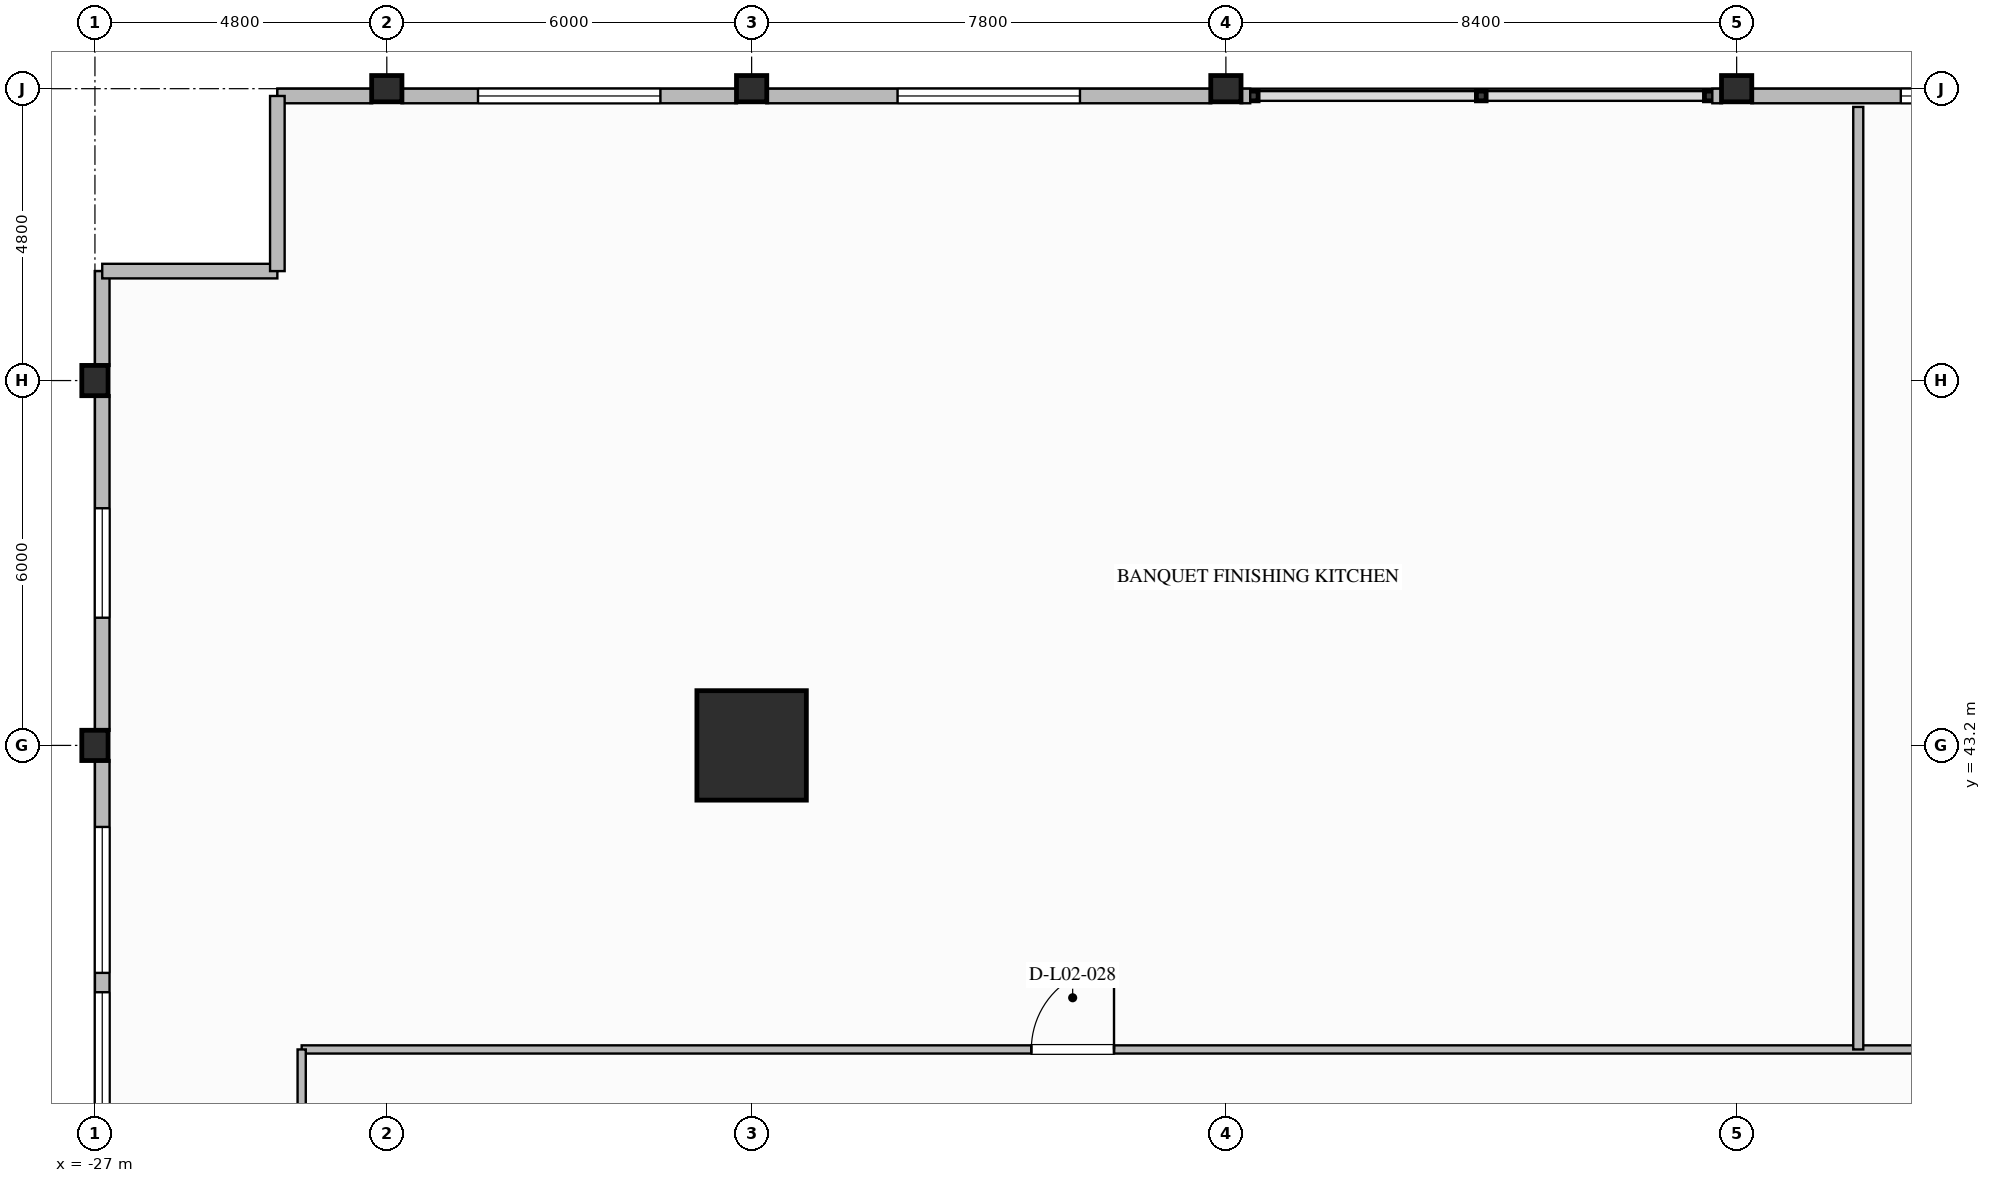
"""IFC4 building model, lengths in metres.
Left out: names, types, materials, properties, quantities, classifications, styles, units other than length and angle.
Written with IfcOpenShell. Run it as: python <this file> out.ifc"""

import sys

from ifc_helpers import new_model, si_unit, direction, frame, frame_2d, origin, origin_2d, place, context, subcontext, project, spatial, rectangle, i_section, extrude, element, fill, save


model = new_model("IFC4")
c1 = context("Model", 3, precision=1e-05, world=origin(), true_north=direction((0.0, 1.0)))
c2 = subcontext(c1, "Body", "Model", "MODEL_VIEW")
j1 = project(units=[si_unit("LENGTHUNIT", "METRE"), si_unit("PLANEANGLEUNIT", "RADIAN")], contexts=[c1])
p1 = place(None, origin())
s1 = spatial("IfcSite", under=j1, at=p1, CompositionType="ELEMENT")
p2 = place(p1, origin())
s2 = spatial("IfcBuilding", under=s1, at=p2, CompositionType="ELEMENT")
p3 = place(p2, frame((0.0, 0.0, 10.8)))
s3 = spatial("IfcBuildingStorey", under=s2, at=p3, CompositionType="ELEMENT", Elevation=10.8)
p4 = place(p3, frame((-16.2, 43.2, 0.0), z_axis=(0.0, 0.0, 1.0), x_axis=(1.0, 0.0, 0.0)))
e1 = element("IfcColumn", 1, at=p4, inside=s3, PredefinedType="COLUMN", context=c2, shape_type="SweptSolid", body=[
    extrude(rectangle(XDim=1.8, YDim=1.8, at=origin_2d()), origin(), (0.0, 0.0, 1.0), 6.4),
])
for number, where, z_axis, x_axis in (
    (2, (-27.0, 43.2, 0.0), (0.0, 0.0, 1.0), (1.0, 0.0, 0.0)),
    (3, (-27.0, 49.2, 0.0), (0.0, 0.0, 1.0), (1.0, 0.0, 0.0)),
    (4, (-22.2, 54.0, 0.0), (0.0, 0.0, 1.0), (0.0, 1.0, 0.0)),
    (5, (-16.2, 54.0, 0.0), (0.0, 0.0, 1.0), (0.0, 1.0, 0.0)),
    (6, (-8.4, 54.0, 0.0), (0.0, 0.0, 1.0), (0.0, 1.0, 0.0)),
    (7, (0.0, 54.0, 0.0), (0.0, 0.0, 1.0), (0.0, 1.0, 0.0)),
):
    element("IfcColumn", number, at=place(p3, frame(where, z_axis=z_axis, x_axis=x_axis)), inside=s3, PredefinedType="COLUMN", context=c2, shape_type="SweptSolid", body=[
        extrude(i_section(OverallWidth=0.432, OverallDepth=0.498, WebThickness=0.056, FlangeThickness=0.089, FilletRadius=0.03, at=origin_2d()), origin(), (0.0, 0.0, 1.0), 6.4),
    ])
p5 = place(p3, frame((-26.88, 35.641, 0.0), z_axis=(0.0, 0.0, 1.0), x_axis=(0.0, 1.0, 0.0)))
e8 = element("IfcWall", 8, at=p5, inside=s3, PredefinedType="STANDARD", context=c2, shape_type="SweptSolid", body=[
    extrude(rectangle(XDim=7.318, YDim=0.24, at=frame_2d((3.659, 0.0))), origin(), (0.0, 0.0, 1.0), 5.404),
])
p6 = place(p5, frame((1.1, 0.0, 0.7)))
e9 = element("IfcOpeningElement", 9, at=p6, cuts=e8, PredefinedType="OPENING", context=c2, shape_type="SweptSolid", body=[
    extrude(rectangle(XDim=2.4, YDim=2.4, at=frame_2d((1.2, 1.2))), frame((0.0, 0.13, 0.0), z_axis=(0.0, -1.0, 0.0), x_axis=(1.0, 0.0, 0.0)), (0.0, 0.0, 1.0), 0.26),
])
p7 = place(p5, frame((3.818, 0.0, 0.7)))
e10 = element("IfcOpeningElement", 10, at=p7, cuts=e8, PredefinedType="OPENING", context=c2, shape_type="SweptSolid", body=[
    extrude(rectangle(XDim=2.4, YDim=2.4, at=frame_2d((1.2, 1.2))), frame((0.0, 0.13, 0.0), z_axis=(0.0, -1.0, 0.0), x_axis=(1.0, 0.0, 0.0)), (0.0, 0.0, 1.0), 0.26),
])
p8 = place(p3, frame((-26.88, 43.441, 0.0), z_axis=(0.0, 0.0, 1.0), x_axis=(0.0, 1.0, 0.0)))
e11 = element("IfcWall", 11, at=p8, inside=s3, PredefinedType="STANDARD", context=c2, shape_type="SweptSolid", body=[
    extrude(rectangle(XDim=5.518, YDim=0.24, at=frame_2d((2.759, 0.0))), origin(), (0.0, 0.0, 1.0), 5.404),
])
p9 = place(p8, frame((1.859, 0.0, 0.7)))
e12 = element("IfcOpeningElement", 12, at=p9, cuts=e11, PredefinedType="OPENING", context=c2, shape_type="SweptSolid", body=[
    extrude(rectangle(XDim=1.8, YDim=2.2, at=frame_2d((0.9, 1.1))), frame((0.0, 0.13, 0.0), z_axis=(0.0, -1.0, 0.0), x_axis=(1.0, 0.0, 0.0)), (0.0, 0.0, 1.0), 0.26),
])
for number, where, z_axis, x_axis in (
    (13, (-26.88, 49.441, 0.0), (0.0, 0.0, 1.0), (0.0, 1.0, 0.0)),
    (14, (-24.0, 53.88, 0.0), (0.0, 0.0, 1.0), (1.0, 0.0, 0.0)),
):
    element("IfcWall", number, at=place(p3, frame(where, z_axis=z_axis, x_axis=x_axis)), inside=s3, PredefinedType="STANDARD", context=c2, shape_type="SweptSolid", body=[
        extrude(rectangle(XDim=1.559, YDim=0.24, at=frame_2d((0.78, 0.0))), origin(), (0.0, 0.0, 1.0), 6.1),
    ])
p10 = place(p3, frame((-21.959, 53.88, 0.0), z_axis=(0.0, 0.0, 1.0), x_axis=(1.0, 0.0, 0.0)))
e15 = element("IfcWall", 15, at=p10, inside=s3, PredefinedType="STANDARD", context=c2, shape_type="SweptSolid", body=[
    extrude(rectangle(XDim=5.518, YDim=0.24, at=frame_2d((2.759, 0.0))), origin(), (0.0, 0.0, 1.0), 5.404),
])
p11 = place(p10, frame((1.259, 0.0, 0.65)))
e16 = element("IfcOpeningElement", 16, at=p11, cuts=e15, PredefinedType="OPENING", context=c2, shape_type="SweptSolid", body=[
    extrude(rectangle(XDim=3.0, YDim=2.2, at=frame_2d((1.5, 1.1))), frame((0.0, 0.13, 0.0), z_axis=(0.0, -1.0, 0.0), x_axis=(1.0, 0.0, 0.0)), (0.0, 0.0, 1.0), 0.26),
])
p12 = place(p3, frame((-15.959, 53.88, 0.0), z_axis=(0.0, 0.0, 1.0), x_axis=(1.0, 0.0, 0.0)))
e17 = element("IfcWall", 17, at=p12, inside=s3, PredefinedType="STANDARD", context=c2, shape_type="SweptSolid", body=[
    extrude(rectangle(XDim=7.318, YDim=0.24, at=frame_2d((3.659, 0.0))), origin(), (0.0, 0.0, 1.0), 5.404),
])
p13 = place(p12, frame((2.159, 0.0, 0.65)))
e18 = element("IfcOpeningElement", 18, at=p13, cuts=e17, PredefinedType="OPENING", context=c2, shape_type="SweptSolid", body=[
    extrude(rectangle(XDim=3.0, YDim=2.2, at=frame_2d((1.5, 1.1))), frame((0.0, 0.13, 0.0), z_axis=(0.0, -1.0, 0.0), x_axis=(1.0, 0.0, 0.0)), (0.0, 0.0, 1.0), 0.26),
])
p14 = place(p3, frame((-8.159, 53.88, 0.0), z_axis=(0.0, 0.0, 1.0), x_axis=(1.0, 0.0, 0.0)))
e19 = element("IfcWall", 19, at=p14, inside=s3, PredefinedType="STANDARD", context=c2, shape_type="SweptSolid", body=[
    extrude(rectangle(XDim=0.159, YDim=0.24, at=frame_2d((0.08, 0.0))), origin(), (0.0, 0.0, 1.0), 6.1),
])
p15 = place(p3, frame((-0.4, 53.88, 0.0), z_axis=(0.0, 0.0, 1.0), x_axis=(1.0, 0.0, 0.0)))
e20 = element("IfcWall", 20, at=p15, inside=s3, PredefinedType="STANDARD", context=c2, shape_type="SweptSolid", body=[
    extrude(rectangle(XDim=0.159, YDim=0.24, at=frame_2d((0.08, 0.0))), origin(), (0.0, 0.0, 1.0), 6.1),
])
p16 = place(p3, frame((0.241, 53.88, 0.0), z_axis=(0.0, 0.0, 1.0), x_axis=(1.0, 0.0, 0.0)))
e21 = element("IfcWall", 21, at=p16, inside=s3, PredefinedType="STANDARD", context=c2, shape_type="SweptSolid", body=[
    extrude(rectangle(XDim=7.918, YDim=0.24, at=frame_2d((3.959, 0.0))), origin(), (0.0, 0.0, 1.0), 5.404),
])
p17 = place(p16, frame((2.459, 0.0, 0.65)))
e22 = element("IfcOpeningElement", 22, at=p17, cuts=e21, PredefinedType="OPENING", context=c2, shape_type="SweptSolid", body=[
    extrude(rectangle(XDim=3.0, YDim=2.2, at=frame_2d((1.5, 1.1))), frame((0.0, 0.13, 0.0), z_axis=(0.0, -1.0, 0.0), x_axis=(1.0, 0.0, 0.0)), (0.0, 0.0, 1.0), 0.26),
])
for number, where, z_axis, x_axis in (
    (23, (-26.88, 51.0, 0.0), (0.0, 0.0, 1.0), (1.0, 0.0, 0.0)),
    (24, (-24.0, 51.0, 0.0), (0.0, 0.0, 1.0), (0.0, 1.0, 0.0)),
):
    element("IfcWall", number, at=place(p3, frame(where, z_axis=z_axis, x_axis=x_axis)), inside=s3, PredefinedType="STANDARD", context=c2, shape_type="SweptSolid", body=[
        extrude(rectangle(XDim=2.88, YDim=0.24, at=frame_2d((1.44, 0.0))), origin(), (0.0, 0.0, 1.0), 6.1),
    ])
p18 = place(p3, frame((-23.6, 38.2, 0.0), z_axis=(0.0, 0.0, 1.0), x_axis=(1.0, 0.0, 0.0)))
e25 = element("IfcWall", 25, at=p18, inside=s3, PredefinedType="PARTITIONING", context=c2, shape_type="SweptSolid", body=[
    extrude(rectangle(XDim=47.3, YDim=0.135, at=frame_2d((23.65, 0.0))), origin(), (0.0, 0.0, 1.0), 6.1),
])
p19 = place(p18, frame((39.2, 0.0, 0.0)))
e26 = element("IfcOpeningElement", 26, at=p19, cuts=e25, PredefinedType="OPENING", context=c2, shape_type="SweptSolid", body=[
    extrude(rectangle(XDim=0.98, YDim=2.1, at=frame_2d((0.49, 1.05))), frame((0.0, 0.077, 0.0), z_axis=(0.0, -1.0, 0.0), x_axis=(1.0, 0.0, 0.0)), (0.0, 0.0, 1.0), 0.155),
])
p20 = place(p18, frame((44.0, 0.0, 0.0)))
e27 = element("IfcOpeningElement", 27, at=p20, cuts=e25, PredefinedType="OPENING", context=c2, shape_type="SweptSolid", body=[
    extrude(rectangle(XDim=0.92, YDim=2.1, at=frame_2d((0.46, 1.05))), frame((0.0, 0.077, 0.0), z_axis=(0.0, -1.0, 0.0), x_axis=(1.0, 0.0, 0.0)), (0.0, 0.0, 1.0), 0.155),
])
p21 = place(p18, frame((12.0, 0.0, 0.0)))
e28 = element("IfcOpeningElement", 28, at=p21, cuts=e25, PredefinedType="OPENING", context=c2, shape_type="SweptSolid", body=[
    extrude(rectangle(XDim=1.36, YDim=2.2, at=frame_2d((0.68, 1.1))), frame((0.0, 0.077, 0.0), z_axis=(0.0, -1.0, 0.0), x_axis=(1.0, 0.0, 0.0)), (0.0, 0.0, 1.0), 0.155),
])
p22 = place(p18, frame((30.0, 0.0, 0.0)))
e29 = element("IfcOpeningElement", 29, at=p22, cuts=e25, PredefinedType="OPENING", context=c2, shape_type="SweptSolid", body=[
    extrude(rectangle(XDim=1.02, YDim=2.15, at=frame_2d((0.51, 1.075))), frame((0.0, 0.077, 0.0), z_axis=(0.0, -1.0, 0.0), x_axis=(1.0, 0.0, 0.0)), (0.0, 0.0, 1.0), 0.155),
])
p23 = place(p3, frame((-23.6, 0.3, 0.0), z_axis=(0.0, 0.0, 1.0), x_axis=(0.0, 1.0, 0.0)))
e30 = element("IfcWall", 30, at=p23, inside=s3, PredefinedType="PARTITIONING", context=c2, shape_type="SweptSolid", body=[
    extrude(rectangle(XDim=37.9, YDim=0.135, at=frame_2d((18.95, 0.0))), origin(), (0.0, 0.0, 1.0), 6.1),
])
p24 = place(p23, frame((9.0, 0.0, 0.0)))
e31 = element("IfcOpeningElement", 31, at=p24, cuts=e30, PredefinedType="OPENING", context=c2, shape_type="SweptSolid", body=[
    extrude(rectangle(XDim=1.08, YDim=2.04, at=frame_2d((0.54, 1.02))), frame((0.0, 0.077, 0.0), z_axis=(0.0, -1.0, 0.0), x_axis=(1.0, 0.0, 0.0)), (0.0, 0.0, 1.0), 0.155),
])
p25 = place(p3, frame((2.0, 38.2, 0.0), z_axis=(0.0, 0.0, 1.0), x_axis=(0.0, 1.0, 0.0)))
e32 = element("IfcWall", 32, at=p25, inside=s3, PredefinedType="PARTITIONING", context=c2, shape_type="SweptSolid", body=[
    extrude(rectangle(XDim=15.5, YDim=0.165, at=frame_2d((7.75, 0.0))), origin(), (0.0, 0.0, 1.0), 6.1),
])
p26 = place(p6, origin())
e33 = element("IfcWindow", 33, at=p26, inside=s3, PartitioningType="SINGLE_PANEL", PredefinedType="WINDOW", context=c2, shape_type="SweptSolid", body=[
    extrude(rectangle(XDim=2.4, YDim=2.4, at=frame_2d((1.2, 1.2))), frame((0.0, 0.03, 0.0), z_axis=(0.0, -1.0, 0.0), x_axis=(1.0, 0.0, 0.0)), (0.0, 0.0, 1.0), 0.06),
])
fill(e9, e33)
p27 = place(p7, origin())
e34 = element("IfcWindow", 34, at=p27, inside=s3, PartitioningType="SINGLE_PANEL", PredefinedType="WINDOW", context=c2, shape_type="SweptSolid", body=[
    extrude(rectangle(XDim=2.4, YDim=2.4, at=frame_2d((1.2, 1.2))), frame((0.0, 0.03, 0.0), z_axis=(0.0, -1.0, 0.0), x_axis=(1.0, 0.0, 0.0)), (0.0, 0.0, 1.0), 0.06),
])
fill(e10, e34)
p28 = place(p9, origin())
e35 = element("IfcWindow", 35, at=p28, inside=s3, PartitioningType="SINGLE_PANEL", PredefinedType="WINDOW", context=c2, shape_type="SweptSolid", body=[
    extrude(rectangle(XDim=1.8, YDim=2.2, at=frame_2d((0.9, 1.1))), frame((0.0, 0.03, 0.0), z_axis=(0.0, -1.0, 0.0), x_axis=(1.0, 0.0, 0.0)), (0.0, 0.0, 1.0), 0.06),
])
fill(e12, e35)
p29 = place(p11, origin())
e36 = element("IfcWindow", 36, at=p29, inside=s3, PartitioningType="SINGLE_PANEL", PredefinedType="WINDOW", context=c2, shape_type="SweptSolid", body=[
    extrude(rectangle(XDim=3.0, YDim=2.2, at=frame_2d((1.5, 1.1))), frame((0.0, 0.03, 0.0), z_axis=(0.0, -1.0, 0.0), x_axis=(1.0, 0.0, 0.0)), (0.0, 0.0, 1.0), 0.06),
])
fill(e16, e36)
p30 = place(p13, origin())
e37 = element("IfcWindow", 37, at=p30, inside=s3, PartitioningType="SINGLE_PANEL", PredefinedType="WINDOW", context=c2, shape_type="SweptSolid", body=[
    extrude(rectangle(XDim=3.0, YDim=2.2, at=frame_2d((1.5, 1.1))), frame((0.0, 0.03, 0.0), z_axis=(0.0, -1.0, 0.0), x_axis=(1.0, 0.0, 0.0)), (0.0, 0.0, 1.0), 0.06),
])
fill(e18, e37)
p31 = place(p17, origin())
e38 = element("IfcWindow", 38, at=p31, inside=s3, PartitioningType="SINGLE_PANEL", PredefinedType="WINDOW", context=c2, shape_type="SweptSolid", body=[
    extrude(rectangle(XDim=3.0, YDim=2.2, at=frame_2d((1.5, 1.1))), frame((0.0, 0.03, 0.0), z_axis=(0.0, -1.0, 0.0), x_axis=(1.0, 0.0, 0.0)), (0.0, 0.0, 1.0), 0.06),
])
fill(e22, e38)
p32 = place(p21, origin())
e39 = element("IfcDoor", 39, at=p32, inside=s3, OperationType="SINGLE_SWING_RIGHT", PredefinedType="DOOR", context=c2, shape_type="SweptSolid", body=[
    extrude(rectangle(XDim=1.36, YDim=2.2, at=frame_2d((0.68, 1.1))), frame((0.0, 0.025, 0.0), z_axis=(0.0, -1.0, 0.0), x_axis=(1.0, 0.0, 0.0)), (0.0, 0.0, 1.0), 0.05),
])
fill(e28, e39)
save(model, sys.argv[1])
